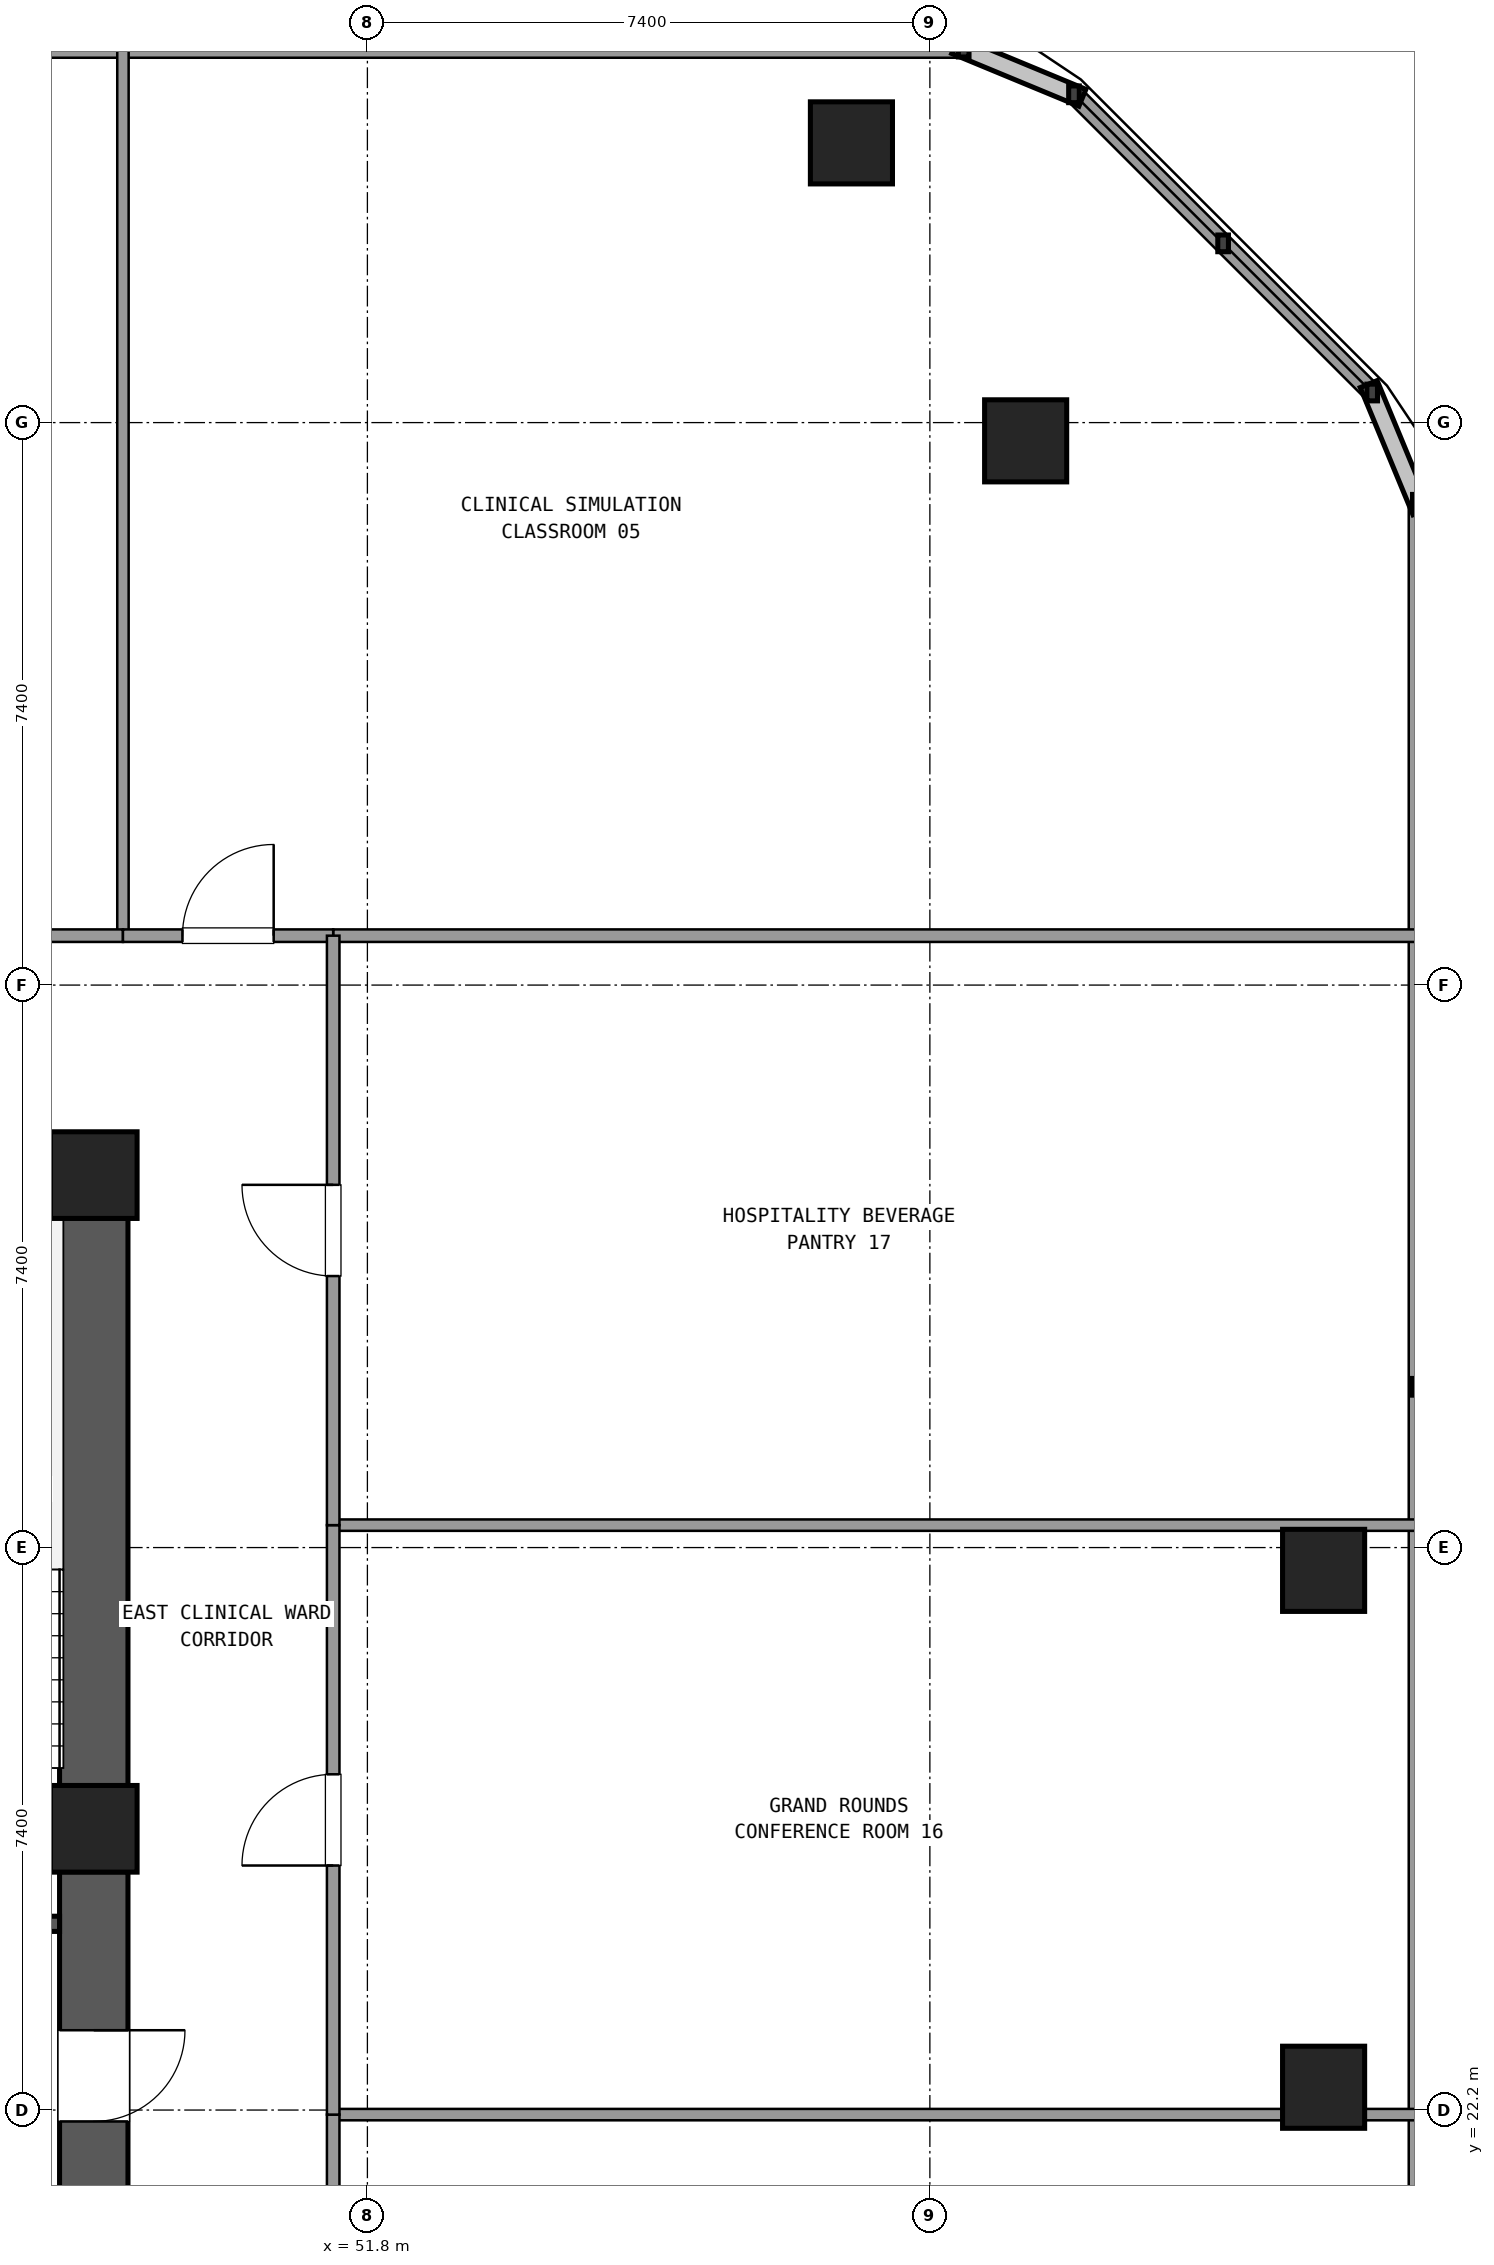
"""IFC4 building model, lengths in metres.
Left out: names, types, materials, properties, quantities, classifications, styles, units other than length and angle.
Written with IfcOpenShell. Run it as: python <this file> out.ifc"""

import sys

from ifc_helpers import new_model, si_unit, direction, frame, frame_2d, origin, origin_2d, place, context, subcontext, project, spatial, rectangle, extrude, element, fill, save


model = new_model("IFC4")
c1 = context("Model", 3, precision=1e-05, world=origin(), true_north=direction((0.0, 1.0)))
c2 = subcontext(c1, "Body", "Model", "MODEL_VIEW")
j1 = project(units=[si_unit("LENGTHUNIT", "METRE"), si_unit("PLANEANGLEUNIT", "RADIAN")], contexts=[c1])
p1 = place(None, origin())
s1 = spatial("IfcSite", under=j1, at=p1, CompositionType="ELEMENT")
p2 = place(p1, origin())
s2 = spatial("IfcBuilding", under=s1, at=p2, CompositionType="ELEMENT")
p3 = place(p2, frame((0.0, 0.0, 49.14)))
s3 = spatial("IfcBuildingStorey", under=s2, at=p3, CompositionType="ELEMENT", Elevation=49.14)
for number, where, z_axis, x_axis in (
    (1, (48.2, 25.9, 0.0), (0.0, 0.0, 1.0), (1.0, 0.0, 0.0)),
    (2, (48.2, 34.5, 0.0), (0.0, 0.0, 1.0), (1.0, 0.0, 0.0)),
):
    element("IfcColumn", number, at=place(p3, frame(where, z_axis=z_axis, x_axis=x_axis)), inside=s3, PredefinedType="COLUMN", context=c2, shape_type="SweptSolid", body=[
        extrude(rectangle(XDim=1.14, YDim=1.14, at=origin_2d()), origin(), (0.0, 0.0, 1.0), 3.6),
    ])
p4 = place(p3, frame((48.2, 17.865, 0.0), z_axis=(0.0, 0.0, 1.0), x_axis=(0.0, 1.0, 0.0)))
e3 = element("IfcWall", 3, at=p4, inside=s3, PredefinedType="SHEAR", context=c2, shape_type="SweptSolid", body=[
    extrude(rectangle(XDim=7.47, YDim=0.9, at=frame_2d((3.735, 0.0))), origin(), (0.0, 0.0, 1.0), 3.32),
])
p5 = place(p4, frame((4.185, 0.0, 0.0)))
e4 = element("IfcOpeningElement", 4, at=p5, cuts=e3, PredefinedType="OPENING", context=c2, shape_type="SweptSolid", body=[
    extrude(rectangle(XDim=1.2, YDim=2.15, at=frame_2d((0.6, 1.075))), frame((0.0, 0.46, 0.0), z_axis=(0.0, -1.0, 0.0), x_axis=(1.0, 0.0, 0.0)), (0.0, 0.0, 1.0), 0.92),
])
p6 = place(p3, frame((48.2, 26.465, 0.0), z_axis=(0.0, 0.0, 1.0), x_axis=(0.0, 1.0, 0.0)))
e5 = element("IfcWall", 5, at=p6, inside=s3, PredefinedType="SHEAR", context=c2, shape_type="SweptSolid", body=[
    extrude(rectangle(XDim=7.47, YDim=0.9, at=frame_2d((3.735, 0.0))), origin(), (0.0, 0.0, 1.0), 3.32),
])
for number, where, z_axis, x_axis in (
    (6, (64.38, 22.5, 0.0), (0.0, 0.0, 1.0), (1.0, 0.0, 0.0)),
    (7, (64.38, 29.3, 0.0), (0.0, 0.0, 1.0), (1.0, 0.0, 0.0)),
    (8, (60.46, 44.16, 0.0), (0.0, 0.0, 1.0), (1.0, 0.0, 0.0)),
    (9, (58.168, 48.08, 0.0), (0.0, 0.0, 1.0), (1.0, 0.0, 0.0)),
):
    element("IfcColumn", number, at=place(p3, frame(where, z_axis=z_axis, x_axis=x_axis)), inside=s3, PredefinedType="COLUMN", context=c2, shape_type="SweptSolid", body=[
        extrude(rectangle(XDim=1.08, YDim=1.08, at=origin_2d()), origin(), (0.0, 0.0, 1.0), 3.6),
    ])
p7 = place(p3, frame((65.62, 8.455, 0.0), z_axis=(0.0, 0.0, 1.0), x_axis=(0.0, 1.0, 0.0)))
e10 = element("IfcWall", 10, at=p7, inside=s3, PredefinedType="SOLIDWALL", context=c2, shape_type="SweptSolid", body=[
    extrude(rectangle(XDim=34.89, YDim=0.24, at=frame_2d((17.445, 0.0))), origin(), (0.0, 0.0, 1.0), 0.85),
])
p8 = place(p3, frame((65.019, 44.796, 0.0), z_axis=(0.0, 0.0, 1.0), x_axis=(-0.707106781187, 0.707106781187, 0.0)))
e11 = element("IfcWall", 11, at=p8, inside=s3, PredefinedType="SOLIDWALL", context=c2, shape_type="SweptSolid", body=[
    extrude(rectangle(XDim=5.548, YDim=0.24, at=frame_2d((2.774, 0.0))), origin(), (0.0, 0.0, 1.0), 0.85),
])
p9 = place(p3, frame((59.645, 49.32, 0.0), z_axis=(0.0, 0.0, 1.0), x_axis=(-1.0, 0.0, 0.0)))
e12 = element("IfcWall", 12, at=p9, inside=s3, PredefinedType="SOLIDWALL", context=c2, shape_type="SweptSolid", body=[
    extrude(rectangle(XDim=45.29, YDim=0.24, at=frame_2d((22.645, 0.0))), origin(), (0.0, 0.0, 1.0), 0.85),
])
p10 = place(p3, frame((43.35, 24.65, 0.0), z_axis=(0.0, 0.0, 1.0), x_axis=(1.0, 0.0, 0.0)))
e13 = element("IfcWall", 13, at=p10, inside=s3, PredefinedType="SHEAR", context=c2, shape_type="SweptSolid", body=[
    extrude(rectangle(XDim=4.4, YDim=0.2, at=frame_2d((2.2, 0.0))), origin(), (0.0, 0.0, 1.0), 3.32),
])
p11 = place(p10, frame((2.0, 0.0, 0.0)))
e14 = element("IfcOpeningElement", 14, at=p11, cuts=e13, PredefinedType="OPENING", context=c2, shape_type="SweptSolid", body=[
    extrude(rectangle(XDim=1.2, YDim=2.15, at=frame_2d((0.6, 1.075))), frame((0.0, 0.11, 0.0), z_axis=(0.0, -1.0, 0.0), x_axis=(1.0, 0.0, 0.0)), (0.0, 0.0, 1.0), 0.22),
])
p12 = place(p3, frame((51.35, 37.65, 0.0), z_axis=(0.0, 0.0, 1.0), x_axis=(1.0, 0.0, 0.0)))
e15 = element("IfcWall", 15, at=p12, inside=s3, PredefinedType="PARTITIONING", context=c2, shape_type="SweptSolid", body=[
    extrude(rectangle(XDim=14.25, YDim=0.165, at=frame_2d((7.125, 0.0))), origin(), (0.0, 0.0, 1.0), 2.61),
])
p13 = place(p3, frame((48.584, 37.65, 0.0), z_axis=(0.0, 0.0, 1.0), x_axis=(0.0, 1.0, 0.0)))
e16 = element("IfcWall", 16, at=p13, inside=s3, PredefinedType="PARTITIONING", context=c2, shape_type="SweptSolid", body=[
    extrude(rectangle(XDim=11.65, YDim=0.15, at=frame_2d((5.825, 0.0))), origin(), (0.0, 0.0, 1.0), 2.61),
])
p14 = place(p3, frame((37.844, 37.65, 0.0), z_axis=(0.0, 0.0, 1.0), x_axis=(1.0, 0.0, 0.0)))
e17 = element("IfcWall", 17, at=p14, inside=s3, PredefinedType="PARTITIONING", context=c2, shape_type="SweptSolid", body=[
    extrude(rectangle(XDim=10.74, YDim=0.165, at=frame_2d((5.37, 0.0))), origin(), (0.0, 0.0, 1.0), 2.61),
])
p15 = place(p14, frame((4.77, 0.0, 0.0)))
e18 = element("IfcOpeningElement", 18, at=p15, cuts=e17, PredefinedType="OPENING", context=c2, shape_type="SweptSolid", body=[
    extrude(rectangle(XDim=1.2, YDim=2.15, at=frame_2d((0.6, 1.075))), frame((0.0, 0.093, 0.0), z_axis=(0.0, -1.0, 0.0), x_axis=(1.0, 0.0, 0.0)), (0.0, 0.0, 1.0), 0.185),
])
p16 = place(p3, frame((48.584, 37.65, 0.0), z_axis=(0.0, 0.0, 1.0), x_axis=(1.0, 0.0, 0.0)))
e19 = element("IfcWall", 19, at=p16, inside=s3, PredefinedType="PARTITIONING", context=c2, shape_type="SweptSolid", body=[
    extrude(rectangle(XDim=2.766, YDim=0.165, at=frame_2d((1.383, 0.0))), origin(), (0.0, 0.0, 1.0), 2.61),
])
p17 = place(p16, frame((0.783, 0.0, 0.0)))
e20 = element("IfcOpeningElement", 20, at=p17, cuts=e19, PredefinedType="OPENING", context=c2, shape_type="SweptSolid", body=[
    extrude(rectangle(XDim=1.2, YDim=2.15, at=frame_2d((0.6, 1.075))), frame((0.0, 0.093, 0.0), z_axis=(0.0, -1.0, 0.0), x_axis=(1.0, 0.0, 0.0)), (0.0, 0.0, 1.0), 0.185),
])
p18 = place(p3, frame((51.35, 22.14, 0.0), z_axis=(0.0, 0.0, 1.0), x_axis=(1.0, 0.0, 0.0)))
e21 = element("IfcWall", 21, at=p18, inside=s3, PredefinedType="PARTITIONING", context=c2, shape_type="SweptSolid", body=[
    extrude(rectangle(XDim=14.25, YDim=0.15, at=frame_2d((7.125, 0.0))), origin(), (0.0, 0.0, 1.0), 2.61),
])
p19 = place(p3, frame((51.35, 14.15, 0.0), z_axis=(0.0, 0.0, 1.0), x_axis=(0.0, 1.0, 0.0)))
e22 = element("IfcWall", 22, at=p19, inside=s3, PredefinedType="PARTITIONING", context=c2, shape_type="SweptSolid", body=[
    extrude(rectangle(XDim=7.99, YDim=0.165, at=frame_2d((3.995, 0.0))), origin(), (0.0, 0.0, 1.0), 2.61),
])
p20 = place(p19, frame((3.395, 0.0, 0.0)))
e23 = element("IfcOpeningElement", 23, at=p20, cuts=e22, PredefinedType="OPENING", context=c2, shape_type="SweptSolid", body=[
    extrude(rectangle(XDim=1.2, YDim=2.15, at=frame_2d((0.6, 1.075))), frame((0.0, 0.093, 0.0), z_axis=(0.0, -1.0, 0.0), x_axis=(1.0, 0.0, 0.0)), (0.0, 0.0, 1.0), 0.185),
])
p21 = place(p3, frame((51.35, 29.895, 0.0), z_axis=(0.0, 0.0, 1.0), x_axis=(1.0, 0.0, 0.0)))
e24 = element("IfcWall", 24, at=p21, inside=s3, PredefinedType="PARTITIONING", context=c2, shape_type="SweptSolid", body=[
    extrude(rectangle(XDim=14.25, YDim=0.15, at=frame_2d((7.125, 0.0))), origin(), (0.0, 0.0, 1.0), 2.61),
])
p22 = place(p3, frame((51.35, 22.14, 0.0), z_axis=(0.0, 0.0, 1.0), x_axis=(0.0, 1.0, 0.0)))
e25 = element("IfcWall", 25, at=p22, inside=s3, PredefinedType="PARTITIONING", context=c2, shape_type="SweptSolid", body=[
    extrude(rectangle(XDim=7.755, YDim=0.165, at=frame_2d((3.877, 0.0))), origin(), (0.0, 0.0, 1.0), 2.61),
])
p23 = place(p22, frame((3.277, 0.0, 0.0)))
e26 = element("IfcOpeningElement", 26, at=p23, cuts=e25, PredefinedType="OPENING", context=c2, shape_type="SweptSolid", body=[
    extrude(rectangle(XDim=1.2, YDim=2.15, at=frame_2d((0.6, 1.075))), frame((0.0, 0.093, 0.0), z_axis=(0.0, -1.0, 0.0), x_axis=(1.0, 0.0, 0.0)), (0.0, 0.0, 1.0), 0.185),
])
p24 = place(p3, frame((51.35, 29.895, 0.0), z_axis=(0.0, 0.0, 1.0), x_axis=(0.0, 1.0, 0.0)))
e27 = element("IfcWall", 27, at=p24, inside=s3, PredefinedType="PARTITIONING", context=c2, shape_type="SweptSolid", body=[
    extrude(rectangle(XDim=7.755, YDim=0.165, at=frame_2d((3.877, 0.0))), origin(), (0.0, 0.0, 1.0), 2.61),
])
p25 = place(p24, frame((3.277, 0.0, 0.0)))
e28 = element("IfcOpeningElement", 28, at=p25, cuts=e27, PredefinedType="OPENING", context=c2, shape_type="SweptSolid", body=[
    extrude(rectangle(XDim=1.2, YDim=2.15, at=frame_2d((0.6, 1.075))), frame((0.0, 0.093, 0.0), z_axis=(0.0, -1.0, 0.0), x_axis=(1.0, 0.0, 0.0)), (0.0, 0.0, 1.0), 0.185),
])
p26 = place(p5, frame((1.2, 0.0, 0.0), z_axis=(0.0, 0.0, 1.0), x_axis=(-1.0, 0.0, 0.0)))
e29 = element("IfcDoor", 29, at=p26, inside=s3, OperationType="SINGLE_SWING_RIGHT", PredefinedType="DOOR", context=c2, shape_type="SweptSolid", body=[
    extrude(rectangle(XDim=1.2, YDim=2.15, at=frame_2d((0.6, 1.075))), frame((0.0, 0.025, 0.0), z_axis=(0.0, -1.0, 0.0), x_axis=(1.0, 0.0, 0.0)), (0.0, 0.0, 1.0), 0.05),
])
fill(e4, e29)
p27 = place(p17, origin())
e30 = element("IfcDoor", 30, at=p27, inside=s3, OperationType="SINGLE_SWING_RIGHT", PredefinedType="DOOR", context=c2, shape_type="SweptSolid", body=[
    extrude(rectangle(XDim=1.2, YDim=2.15, at=frame_2d((0.6, 1.075))), frame((0.0, 0.025, 0.0), z_axis=(0.0, -1.0, 0.0), x_axis=(1.0, 0.0, 0.0)), (0.0, 0.0, 1.0), 0.05),
])
fill(e20, e30)
p28 = place(p23, origin())
e31 = element("IfcDoor", 31, at=p28, inside=s3, OperationType="SINGLE_SWING_LEFT", PredefinedType="DOOR", context=c2, shape_type="SweptSolid", body=[
    extrude(rectangle(XDim=1.2, YDim=2.15, at=frame_2d((0.6, 1.075))), frame((0.0, 0.025, 0.0), z_axis=(0.0, -1.0, 0.0), x_axis=(1.0, 0.0, 0.0)), (0.0, 0.0, 1.0), 0.05),
])
fill(e26, e31)
p29 = place(p25, origin())
e32 = element("IfcDoor", 32, at=p29, inside=s3, OperationType="SINGLE_SWING_RIGHT", PredefinedType="DOOR", context=c2, shape_type="SweptSolid", body=[
    extrude(rectangle(XDim=1.2, YDim=2.15, at=frame_2d((0.6, 1.075))), frame((0.0, 0.025, 0.0), z_axis=(0.0, -1.0, 0.0), x_axis=(1.0, 0.0, 0.0)), (0.0, 0.0, 1.0), 0.05),
])
fill(e28, e32)
save(model, sys.argv[1])
